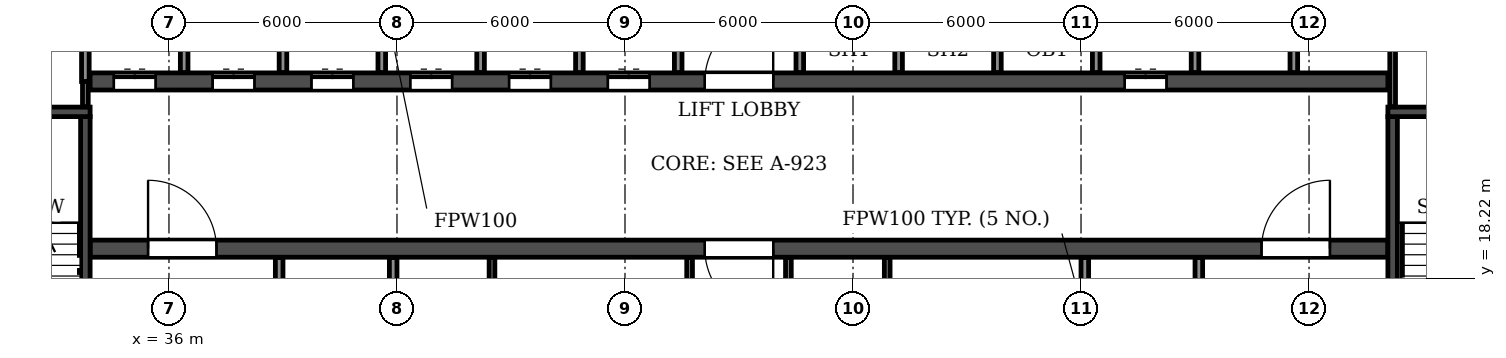
"""IFC4 building model, lengths in metres.
Left out: names, types, materials, properties, quantities, classifications, styles, units other than length and angle.
Written with IfcOpenShell. Run it as: python <this file> out.ifc"""

import sys

from ifc_helpers import new_model, si_unit, direction, frame, frame_2d, origin, place, context, subcontext, project, spatial, rectangle, extrude, element, fill, save


model = new_model("IFC4")
c1 = context("Model", 3, precision=1e-05, world=origin(), true_north=direction((0.0, 1.0)))
c2 = subcontext(c1, "Body", "Model", "MODEL_VIEW")
j1 = project(units=[si_unit("LENGTHUNIT", "METRE"), si_unit("PLANEANGLEUNIT", "RADIAN")], contexts=[c1])
p1 = place(None, origin())
s1 = spatial("IfcSite", under=j1, at=p1, CompositionType="ELEMENT")
p2 = place(p1, origin())
s2 = spatial("IfcBuilding", under=s1, at=p2, CompositionType="ELEMENT")
p3 = place(p2, frame((0.0, 0.0, 122.4)))
s3 = spatial("IfcBuildingStorey", under=s2, at=p3, CompositionType="ELEMENT", Elevation=122.4)
p4 = place(p3, frame((33.925, 19.0, 0.0), z_axis=(0.0, 0.0, 1.0), x_axis=(1.0, 0.0, 0.0)))
e1 = element("IfcWall", 1, at=p4, inside=s3, PredefinedType="SOLIDWALL", context=c2, shape_type="SweptSolid", body=[
    extrude(rectangle(XDim=34.15, YDim=0.45, at=frame_2d((17.075, 0.0))), origin(), (0.0, 0.0, 1.0), 3.07),
])
p5 = place(p4, frame((16.175, 0.0, 0.0)))
e2 = element("IfcOpeningElement", 2, at=p5, cuts=e1, PredefinedType="OPENING", context=c2, shape_type="SweptSolid", body=[
    extrude(rectangle(XDim=1.8, YDim=2.1, at=frame_2d((0.9, 1.05))), frame((0.0, 0.235, 0.0), z_axis=(0.0, -1.0, 0.0), x_axis=(1.0, 0.0, 0.0)), (0.0, 0.0, 1.0), 0.47),
])
p6 = place(p4, frame((1.525, 0.0, 0.0)))
e3 = element("IfcOpeningElement", 3, at=p6, cuts=e1, PredefinedType="OPENING", context=c2, shape_type="SweptSolid", body=[
    extrude(rectangle(XDim=1.8, YDim=2.1, at=frame_2d((0.9, 1.05))), frame((0.0, 0.235, 0.0), z_axis=(0.0, -1.0, 0.0), x_axis=(1.0, 0.0, 0.0)), (0.0, 0.0, 1.0), 0.47),
])
p7 = place(p4, frame((30.825, 0.0, 0.0)))
e4 = element("IfcOpeningElement", 4, at=p7, cuts=e1, PredefinedType="OPENING", context=c2, shape_type="SweptSolid", body=[
    extrude(rectangle(XDim=1.8, YDim=2.1, at=frame_2d((0.9, 1.05))), frame((0.0, 0.235, 0.0), z_axis=(0.0, -1.0, 0.0), x_axis=(1.0, 0.0, 0.0)), (0.0, 0.0, 1.0), 0.47),
])
p8 = place(p3, frame((33.925, 23.4, 0.0), z_axis=(0.0, 0.0, 1.0), x_axis=(1.0, 0.0, 0.0)))
e5 = element("IfcWall", 5, at=p8, inside=s3, PredefinedType="SOLIDWALL", context=c2, shape_type="SweptSolid", body=[
    extrude(rectangle(XDim=34.15, YDim=0.45, at=frame_2d((17.075, 0.0))), origin(), (0.0, 0.0, 1.0), 3.07),
])
p9 = place(p8, frame((16.175, 0.0, 0.0)))
e6 = element("IfcOpeningElement", 6, at=p9, cuts=e5, PredefinedType="OPENING", context=c2, shape_type="SweptSolid", body=[
    extrude(rectangle(XDim=1.8, YDim=2.1, at=frame_2d((0.9, 1.05))), frame((0.0, 0.235, 0.0), z_axis=(0.0, -1.0, 0.0), x_axis=(1.0, 0.0, 0.0)), (0.0, 0.0, 1.0), 0.47),
])
p10 = place(p8, frame((0.625, 0.0, 0.0)))
e7 = element("IfcOpeningElement", 7, at=p10, cuts=e5, PredefinedType="OPENING", context=c2, shape_type="SweptSolid", body=[
    extrude(rectangle(XDim=1.1, YDim=2.1, at=frame_2d((0.55, 1.05))), frame((0.0, 0.235, 0.0), z_axis=(0.0, -1.0, 0.0), x_axis=(1.0, 0.0, 0.0)), (0.0, 0.0, 1.0), 0.47),
])
p11 = place(p8, frame((3.225, 0.0, 0.0)))
e8 = element("IfcOpeningElement", 8, at=p11, cuts=e5, PredefinedType="OPENING", context=c2, shape_type="SweptSolid", body=[
    extrude(rectangle(XDim=1.1, YDim=2.1, at=frame_2d((0.55, 1.05))), frame((0.0, 0.235, 0.0), z_axis=(0.0, -1.0, 0.0), x_axis=(1.0, 0.0, 0.0)), (0.0, 0.0, 1.0), 0.47),
])
p12 = place(p8, frame((5.825, 0.0, 0.0)))
e9 = element("IfcOpeningElement", 9, at=p12, cuts=e5, PredefinedType="OPENING", context=c2, shape_type="SweptSolid", body=[
    extrude(rectangle(XDim=1.1, YDim=2.1, at=frame_2d((0.55, 1.05))), frame((0.0, 0.235, 0.0), z_axis=(0.0, -1.0, 0.0), x_axis=(1.0, 0.0, 0.0)), (0.0, 0.0, 1.0), 0.47),
])
p13 = place(p8, frame((8.425, 0.0, 0.0)))
e10 = element("IfcOpeningElement", 10, at=p13, cuts=e5, PredefinedType="OPENING", context=c2, shape_type="SweptSolid", body=[
    extrude(rectangle(XDim=1.1, YDim=2.1, at=frame_2d((0.55, 1.05))), frame((0.0, 0.235, 0.0), z_axis=(0.0, -1.0, 0.0), x_axis=(1.0, 0.0, 0.0)), (0.0, 0.0, 1.0), 0.47),
])
p14 = place(p8, frame((11.025, 0.0, 0.0)))
e11 = element("IfcOpeningElement", 11, at=p14, cuts=e5, PredefinedType="OPENING", context=c2, shape_type="SweptSolid", body=[
    extrude(rectangle(XDim=1.1, YDim=2.1, at=frame_2d((0.55, 1.05))), frame((0.0, 0.235, 0.0), z_axis=(0.0, -1.0, 0.0), x_axis=(1.0, 0.0, 0.0)), (0.0, 0.0, 1.0), 0.47),
])
p15 = place(p8, frame((13.625, 0.0, 0.0)))
e12 = element("IfcOpeningElement", 12, at=p15, cuts=e5, PredefinedType="OPENING", context=c2, shape_type="SweptSolid", body=[
    extrude(rectangle(XDim=1.1, YDim=2.1, at=frame_2d((0.55, 1.05))), frame((0.0, 0.235, 0.0), z_axis=(0.0, -1.0, 0.0), x_axis=(1.0, 0.0, 0.0)), (0.0, 0.0, 1.0), 0.47),
])
p16 = place(p8, frame((27.225, 0.0, 0.0)))
e13 = element("IfcOpeningElement", 13, at=p16, cuts=e5, PredefinedType="OPENING", context=c2, shape_type="SweptSolid", body=[
    extrude(rectangle(XDim=1.1, YDim=2.1, at=frame_2d((0.55, 1.05))), frame((0.0, 0.235, 0.0), z_axis=(0.0, -1.0, 0.0), x_axis=(1.0, 0.0, 0.0)), (0.0, 0.0, 1.0), 0.47),
])
p17 = place(p3, frame((33.8, 14.825, 0.0), z_axis=(0.0, 0.0, 1.0), x_axis=(0.0, 1.0, 0.0)))
e14 = element("IfcWall", 14, at=p17, inside=s3, PredefinedType="SOLIDWALL", context=c2, shape_type="SweptSolid", body=[
    extrude(rectangle(XDim=7.65, YDim=0.25, at=frame_2d((3.825, 0.0))), origin(), (0.0, 0.0, 1.0), 3.07),
])
p18 = place(p17, frame((0.475, 0.0, 0.0)))
e15 = element("IfcOpeningElement", 15, at=p18, cuts=e14, PredefinedType="OPENING", context=c2, shape_type="SweptSolid", body=[
    extrude(rectangle(XDim=1.0, YDim=2.1, at=frame_2d((0.5, 1.05))), frame((0.0, 0.135, 0.0), z_axis=(0.0, -1.0, 0.0), x_axis=(1.0, 0.0, 0.0)), (0.0, 0.0, 1.0), 0.27),
])
p19 = place(p3, frame((29.875, 22.6, 0.0), z_axis=(0.0, 0.0, 1.0), x_axis=(1.0, 0.0, 0.0)))
e16 = element("IfcWall", 16, at=p19, inside=s3, PredefinedType="SOLIDWALL", context=c2, shape_type="SweptSolid", body=[
    extrude(rectangle(XDim=4.05, YDim=0.25, at=frame_2d((2.025, 0.0))), origin(), (0.0, 0.0, 1.0), 3.07),
])
p20 = place(p3, frame((68.2, 14.825, 0.0), z_axis=(0.0, 0.0, 1.0), x_axis=(0.0, 1.0, 0.0)))
e17 = element("IfcWall", 17, at=p20, inside=s3, PredefinedType="SOLIDWALL", context=c2, shape_type="SweptSolid", body=[
    extrude(rectangle(XDim=7.65, YDim=0.25, at=frame_2d((3.825, 0.0))), origin(), (0.0, 0.0, 1.0), 3.07),
])
p21 = place(p20, frame((0.475, 0.0, 0.0)))
e18 = element("IfcOpeningElement", 18, at=p21, cuts=e17, PredefinedType="OPENING", context=c2, shape_type="SweptSolid", body=[
    extrude(rectangle(XDim=1.0, YDim=2.1, at=frame_2d((0.5, 1.05))), frame((0.0, 0.135, 0.0), z_axis=(0.0, -1.0, 0.0), x_axis=(1.0, 0.0, 0.0)), (0.0, 0.0, 1.0), 0.27),
])
p22 = place(p3, frame((68.075, 22.6, 0.0), z_axis=(0.0, 0.0, 1.0), x_axis=(1.0, 0.0, 0.0)))
e19 = element("IfcWall", 19, at=p22, inside=s3, PredefinedType="SOLIDWALL", context=c2, shape_type="SweptSolid", body=[
    extrude(rectangle(XDim=4.05, YDim=0.25, at=frame_2d((2.025, 0.0))), origin(), (0.0, 0.0, 1.0), 3.07),
])
for number, where, z_axis, x_axis in (
    (20, (49.7, 14.835, 0.0), (0.0, 0.0, 1.0), (0.0, 1.0, 0.0)),
    (21, (52.3, 14.835, 0.0), (0.0, 0.0, 1.0), (0.0, 1.0, 0.0)),
    (22, (44.5, 14.835, 0.0), (0.0, 0.0, 1.0), (0.0, 1.0, 0.0)),
    (23, (54.9, 14.835, 0.0), (0.0, 0.0, 1.0), (0.0, 1.0, 0.0)),
):
    element("IfcWall", number, at=place(p3, frame(where, z_axis=z_axis, x_axis=x_axis)), inside=s3, PredefinedType="PARTITIONING", context=c2, shape_type="SweptSolid", body=[
        extrude(rectangle(XDim=3.93, YDim=0.15, at=frame_2d((1.965, 0.0))), origin(), (0.0, 0.0, 1.0), 3.07),
    ])
p23 = place(p3, frame((65.6, 23.635, 0.0), z_axis=(0.0, 0.0, 1.0), x_axis=(0.0, 1.0, 0.0)))
e24 = element("IfcWall", 24, at=p23, inside=s3, PredefinedType="PARTITIONING", context=c2, shape_type="SweptSolid", body=[
    extrude(rectangle(XDim=3.93, YDim=0.2, at=frame_2d((1.965, 0.0))), origin(), (0.0, 0.0, 1.0), 3.07),
])
p24 = place(p3, frame((33.8, 22.735, 0.0), z_axis=(0.0, 0.0, 1.0), x_axis=(0.0, 1.0, 0.0)))
e25 = element("IfcWall", 25, at=p24, inside=s3, PredefinedType="PARTITIONING", context=c2, shape_type="SweptSolid", body=[
    extrude(rectangle(XDim=0.665, YDim=0.15, at=frame_2d((0.333, 0.0))), origin(), (0.0, 0.0, 1.0), 3.07),
])
p25 = place(p3, frame((68.2, 22.735, 0.0), z_axis=(0.0, 0.0, 1.0), x_axis=(0.0, 1.0, 0.0)))
e26 = element("IfcWall", 26, at=p25, inside=s3, PredefinedType="PARTITIONING", context=c2, shape_type="SweptSolid", body=[
    extrude(rectangle(XDim=4.83, YDim=0.15, at=frame_2d((2.415, 0.0))), origin(), (0.0, 0.0, 1.0), 3.07),
])
p26 = place(p3, frame((33.8, 23.4, 0.0), z_axis=(0.0, 0.0, 1.0), x_axis=(0.0, 1.0, 0.0)))
e27 = element("IfcWall", 27, at=p26, inside=s3, PredefinedType="PARTITIONING", context=c2, shape_type="SweptSolid", body=[
    extrude(rectangle(XDim=2.7, YDim=0.2, at=frame_2d((1.35, 0.0))), origin(), (0.0, 0.0, 1.0), 3.07),
])
p27 = place(p3, frame((36.4, 23.635, 0.0), z_axis=(0.0, 0.0, 1.0), x_axis=(0.0, 1.0, 0.0)))
e28 = element("IfcWall", 28, at=p27, inside=s3, PredefinedType="PARTITIONING", context=c2, shape_type="SweptSolid", body=[
    extrude(rectangle(XDim=2.465, YDim=0.2, at=frame_2d((1.232, 0.0))), origin(), (0.0, 0.0, 1.0), 3.07),
])
p28 = place(p3, frame((38.9, 14.835, 0.0), z_axis=(0.0, 0.0, 1.0), x_axis=(0.0, 1.0, 0.0)))
e29 = element("IfcWall", 29, at=p28, inside=s3, PredefinedType="PARTITIONING", context=c2, shape_type="SweptSolid", body=[
    extrude(rectangle(XDim=3.93, YDim=0.2, at=frame_2d((1.965, 0.0))), origin(), (0.0, 0.0, 1.0), 3.07),
])
p29 = place(p28, frame((1.415, 0.0, 0.0)))
e30 = element("IfcOpeningElement", 30, at=p29, cuts=e29, PredefinedType="OPENING", context=c2, shape_type="SweptSolid", body=[
    extrude(rectangle(XDim=1.1, YDim=2.1, at=frame_2d((0.55, 1.05))), frame((0.0, 0.11, 0.0), z_axis=(0.0, -1.0, 0.0), x_axis=(1.0, 0.0, 0.0)), (0.0, 0.0, 1.0), 0.22),
])
for number, where, z_axis, x_axis in (
    (31, (39.0, 23.635, 0.0), (0.0, 0.0, 1.0), (0.0, 1.0, 0.0)),
    (32, (41.6, 23.635, 0.0), (0.0, 0.0, 1.0), (0.0, 1.0, 0.0)),
):
    element("IfcWall", number, at=place(p3, frame(where, z_axis=z_axis, x_axis=x_axis)), inside=s3, PredefinedType="PARTITIONING", context=c2, shape_type="SweptSolid", body=[
        extrude(rectangle(XDim=2.465, YDim=0.2, at=frame_2d((1.232, 0.0))), origin(), (0.0, 0.0, 1.0), 3.07),
    ])
for number, where, z_axis, x_axis in (
    (33, (41.9, 14.835, 0.0), (0.0, 0.0, 1.0), (0.0, 1.0, 0.0)),
    (34, (44.2, 23.635, 0.0), (0.0, 0.0, 1.0), (0.0, 1.0, 0.0)),
    (35, (46.8, 23.635, 0.0), (0.0, 0.0, 1.0), (0.0, 1.0, 0.0)),
):
    element("IfcWall", number, at=place(p3, frame(where, z_axis=z_axis, x_axis=x_axis)), inside=s3, PredefinedType="PARTITIONING", context=c2, shape_type="SweptSolid", body=[
        extrude(rectangle(XDim=3.93, YDim=0.2, at=frame_2d((1.965, 0.0))), origin(), (0.0, 0.0, 1.0), 3.07),
    ])
for number, where, z_axis, x_axis in (
    (36, (49.4, 23.635, 0.0), (0.0, 0.0, 1.0), (0.0, 1.0, 0.0)),
    (37, (52.6, 23.635, 0.0), (0.0, 0.0, 1.0), (0.0, 1.0, 0.0)),
    (38, (55.2, 23.635, 0.0), (0.0, 0.0, 1.0), (0.0, 1.0, 0.0)),
    (39, (57.8, 23.635, 0.0), (0.0, 0.0, 1.0), (0.0, 1.0, 0.0)),
):
    element("IfcWall", number, at=place(p3, frame(where, z_axis=z_axis, x_axis=x_axis)), inside=s3, PredefinedType="PARTITIONING", context=c2, shape_type="SweptSolid", body=[
        extrude(rectangle(XDim=2.465, YDim=0.2, at=frame_2d((1.232, 0.0))), origin(), (0.0, 0.0, 1.0), 3.07),
    ])
p30 = place(p3, frame((60.1, 14.835, 0.0), z_axis=(0.0, 0.0, 1.0), x_axis=(0.0, 1.0, 0.0)))
e40 = element("IfcWall", 40, at=p30, inside=s3, PredefinedType="PARTITIONING", context=c2, shape_type="SweptSolid", body=[
    extrude(rectangle(XDim=3.93, YDim=0.2, at=frame_2d((1.965, 0.0))), origin(), (0.0, 0.0, 1.0), 3.07),
])
for number, where, z_axis, x_axis in (
    (41, (60.4, 23.635, 0.0), (0.0, 0.0, 1.0), (0.0, 1.0, 0.0)),
    (42, (63.0, 23.635, 0.0), (0.0, 0.0, 1.0), (0.0, 1.0, 0.0)),
):
    element("IfcWall", number, at=place(p3, frame(where, z_axis=z_axis, x_axis=x_axis)), inside=s3, PredefinedType="PARTITIONING", context=c2, shape_type="SweptSolid", body=[
        extrude(rectangle(XDim=2.465, YDim=0.2, at=frame_2d((1.232, 0.0))), origin(), (0.0, 0.0, 1.0), 3.07),
    ])
p31 = place(p3, frame((63.1, 14.835, 0.0), z_axis=(0.0, 0.0, 1.0), x_axis=(0.0, 1.0, 0.0)))
e43 = element("IfcWall", 43, at=p31, inside=s3, PredefinedType="PARTITIONING", context=c2, shape_type="SweptSolid", body=[
    extrude(rectangle(XDim=3.93, YDim=0.2, at=frame_2d((1.965, 0.0))), origin(), (0.0, 0.0, 1.0), 3.07),
])
p32 = place(p31, frame((1.415, 0.0, 0.0)))
e44 = element("IfcOpeningElement", 44, at=p32, cuts=e43, PredefinedType="OPENING", context=c2, shape_type="SweptSolid", body=[
    extrude(rectangle(XDim=1.1, YDim=2.1, at=frame_2d((0.55, 1.05))), frame((0.0, 0.11, 0.0), z_axis=(0.0, -1.0, 0.0), x_axis=(1.0, 0.0, 0.0)), (0.0, 0.0, 1.0), 0.22),
])
p33 = place(p9, origin())
e45 = element("IfcDoor", 45, at=p33, inside=s3, OperationType="DOUBLE_DOOR_SINGLE_SWING", PredefinedType="DOOR", context=c2, shape_type="SweptSolid", body=[
    extrude(rectangle(XDim=1.8, YDim=2.1, at=frame_2d((0.9, 1.05))), frame((0.0, 0.025, 0.0), z_axis=(0.0, -1.0, 0.0), x_axis=(1.0, 0.0, 0.0)), (0.0, 0.0, 1.0), 0.05),
])
fill(e6, e45)
p34 = place(p5, frame((1.8, 0.0, 0.0), z_axis=(0.0, 0.0, 1.0), x_axis=(-1.0, 0.0, 0.0)))
e46 = element("IfcDoor", 46, at=p34, inside=s3, OperationType="DOUBLE_DOOR_SINGLE_SWING", PredefinedType="DOOR", context=c2, shape_type="SweptSolid", body=[
    extrude(rectangle(XDim=1.8, YDim=2.1, at=frame_2d((0.9, 1.05))), frame((0.0, 0.025, 0.0), z_axis=(0.0, -1.0, 0.0), x_axis=(1.0, 0.0, 0.0)), (0.0, 0.0, 1.0), 0.05),
])
fill(e2, e46)
p35 = place(p10, origin())
e47 = element("IfcDoor", 47, at=p35, inside=s3, OperationType="DOUBLE_DOOR_SLIDING", PredefinedType="DOOR", context=c2, shape_type="SweptSolid", body=[
    extrude(rectangle(XDim=1.1, YDim=2.1, at=frame_2d((0.55, 1.05))), frame((0.0, 0.025, 0.0), z_axis=(0.0, -1.0, 0.0), x_axis=(1.0, 0.0, 0.0)), (0.0, 0.0, 1.0), 0.05),
])
fill(e7, e47)
p36 = place(p6, origin())
e48 = element("IfcDoor", 48, at=p36, inside=s3, OperationType="DOUBLE_DOOR_SINGLE_SWING", PredefinedType="DOOR", context=c2, shape_type="SweptSolid", body=[
    extrude(rectangle(XDim=1.8, YDim=2.1, at=frame_2d((0.9, 1.05))), frame((0.0, 0.025, 0.0), z_axis=(0.0, -1.0, 0.0), x_axis=(1.0, 0.0, 0.0)), (0.0, 0.0, 1.0), 0.05),
])
fill(e3, e48)
p37 = place(p11, origin())
e49 = element("IfcDoor", 49, at=p37, inside=s3, OperationType="DOUBLE_DOOR_SLIDING", PredefinedType="DOOR", context=c2, shape_type="SweptSolid", body=[
    extrude(rectangle(XDim=1.1, YDim=2.1, at=frame_2d((0.55, 1.05))), frame((0.0, 0.025, 0.0), z_axis=(0.0, -1.0, 0.0), x_axis=(1.0, 0.0, 0.0)), (0.0, 0.0, 1.0), 0.05),
])
fill(e8, e49)
p38 = place(p12, origin())
e50 = element("IfcDoor", 50, at=p38, inside=s3, OperationType="DOUBLE_DOOR_SLIDING", PredefinedType="DOOR", context=c2, shape_type="SweptSolid", body=[
    extrude(rectangle(XDim=1.1, YDim=2.1, at=frame_2d((0.55, 1.05))), frame((0.0, 0.025, 0.0), z_axis=(0.0, -1.0, 0.0), x_axis=(1.0, 0.0, 0.0)), (0.0, 0.0, 1.0), 0.05),
])
fill(e9, e50)
p39 = place(p13, origin())
e51 = element("IfcDoor", 51, at=p39, inside=s3, OperationType="DOUBLE_DOOR_SLIDING", PredefinedType="DOOR", context=c2, shape_type="SweptSolid", body=[
    extrude(rectangle(XDim=1.1, YDim=2.1, at=frame_2d((0.55, 1.05))), frame((0.0, 0.025, 0.0), z_axis=(0.0, -1.0, 0.0), x_axis=(1.0, 0.0, 0.0)), (0.0, 0.0, 1.0), 0.05),
])
fill(e10, e51)
p40 = place(p14, origin())
e52 = element("IfcDoor", 52, at=p40, inside=s3, OperationType="DOUBLE_DOOR_SLIDING", PredefinedType="DOOR", context=c2, shape_type="SweptSolid", body=[
    extrude(rectangle(XDim=1.1, YDim=2.1, at=frame_2d((0.55, 1.05))), frame((0.0, 0.025, 0.0), z_axis=(0.0, -1.0, 0.0), x_axis=(1.0, 0.0, 0.0)), (0.0, 0.0, 1.0), 0.05),
])
fill(e11, e52)
p41 = place(p15, origin())
e53 = element("IfcDoor", 53, at=p41, inside=s3, OperationType="DOUBLE_DOOR_SLIDING", PredefinedType="DOOR", context=c2, shape_type="SweptSolid", body=[
    extrude(rectangle(XDim=1.1, YDim=2.1, at=frame_2d((0.55, 1.05))), frame((0.0, 0.025, 0.0), z_axis=(0.0, -1.0, 0.0), x_axis=(1.0, 0.0, 0.0)), (0.0, 0.0, 1.0), 0.05),
])
fill(e12, e53)
p42 = place(p16, origin())
e54 = element("IfcDoor", 54, at=p42, inside=s3, OperationType="DOUBLE_DOOR_SLIDING", PredefinedType="DOOR", context=c2, shape_type="SweptSolid", body=[
    extrude(rectangle(XDim=1.1, YDim=2.1, at=frame_2d((0.55, 1.05))), frame((0.0, 0.025, 0.0), z_axis=(0.0, -1.0, 0.0), x_axis=(1.0, 0.0, 0.0)), (0.0, 0.0, 1.0), 0.05),
])
fill(e13, e54)
p43 = place(p7, origin())
e55 = element("IfcDoor", 55, at=p43, inside=s3, OperationType="DOUBLE_DOOR_SINGLE_SWING", PredefinedType="DOOR", context=c2, shape_type="SweptSolid", body=[
    extrude(rectangle(XDim=1.8, YDim=2.1, at=frame_2d((0.9, 1.05))), frame((0.0, 0.025, 0.0), z_axis=(0.0, -1.0, 0.0), x_axis=(1.0, 0.0, 0.0)), (0.0, 0.0, 1.0), 0.05),
])
fill(e4, e55)
save(model, sys.argv[1])
